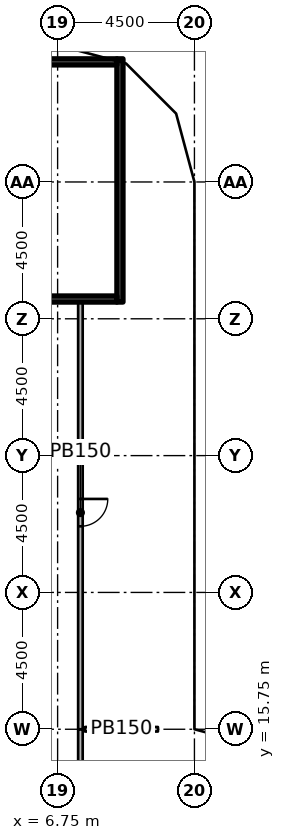
"""IFC4 building model, lengths in metres.
Left out: names, types, materials, properties, quantities, classifications, styles, units other than length and angle.
Written with IfcOpenShell. Run it as: python <this file> out.ifc"""

import sys

from ifc_helpers import new_model, si_unit, direction, frame, frame_2d, origin, origin_2d, place, context, subcontext, project, spatial, rectangle, extrude, element, fill, save


model = new_model("IFC4")
c1 = context("Model", 3, precision=1e-05, world=origin(), true_north=direction((0.0, 1.0)))
c2 = subcontext(c1, "Body", "Model", "MODEL_VIEW")
j1 = project(units=[si_unit("LENGTHUNIT", "METRE"), si_unit("PLANEANGLEUNIT", "RADIAN")], contexts=[c1])
p1 = place(None, origin())
s1 = spatial("IfcSite", under=j1, at=p1, CompositionType="ELEMENT")
p2 = place(p1, origin())
s2 = spatial("IfcBuilding", under=s1, at=p2, CompositionType="ELEMENT")
p3 = place(p2, frame((0.0, 0.0, 22.0)))
s3 = spatial("IfcBuildingStorey", under=s2, at=p3, CompositionType="ELEMENT", Elevation=22.0)
for number, where, z_axis, x_axis in (
    (1, (6.25, 15.75, 0.0), (0.0, 0.0, 1.0), (1.0, 0.0, 0.0)),
    (2, (6.25, 20.25, 0.0), (0.0, 0.0, 1.0), (1.0, 0.0, 0.0)),
    (3, (6.25, 24.65, 0.0), (0.0, 0.0, 1.0), (1.0, 0.0, 0.0)),
    (4, (6.25, 26.7, 0.0), (0.0, 0.0, 1.0), (1.0, 0.0, 0.0)),
):
    element("IfcColumn", number, at=place(p3, frame(where, z_axis=z_axis, x_axis=x_axis)), inside=s3, PredefinedType="COLUMN", context=c2, shape_type="SweptSolid", body=[
        extrude(rectangle(XDim=1.2, YDim=1.2, at=origin_2d()), origin(), (0.0, 0.0, 1.0), 4.85),
    ])
for number, where, z_axis, x_axis in (
    (5, (10.65, 15.15, 0.0), (0.0, 0.0, 1.0), (1.0, 0.0, 0.0)),
    (6, (10.65, 20.25, 0.0), (0.0, 0.0, 1.0), (1.0, 0.0, 0.0)),
    (7, (10.47, 33.75, 0.0), (0.0, 0.0, 1.0), (1.0, 0.0, 0.0)),
):
    element("IfcColumn", number, at=place(p3, frame(where, z_axis=z_axis, x_axis=x_axis)), inside=s3, PredefinedType="COLUMN", context=c2, shape_type="SweptSolid", body=[
        extrude(rectangle(XDim=1.2, YDim=1.2, at=origin_2d()), origin(), (0.0, 0.0, 1.0), 4.55),
    ])
p4 = place(p3, frame((8.8, 29.8, 0.0), z_axis=(0.0, 0.0, 1.0), x_axis=(0.0, 1.0, 0.0)))
e8 = element("IfcWall", 8, at=p4, inside=s3, PredefinedType="SHEAR", context=c2, shape_type="SweptSolid", body=[
    extrude(rectangle(XDim=8.0, YDim=0.2, at=frame_2d((4.0, 0.0))), origin(), (0.0, 0.0, 1.0), 4.55),
])
for number, where, z_axis, x_axis in (
    (9, (4.5, 29.9, 0.0), (0.0, 0.0, 1.0), (1.0, 0.0, 0.0)),
    (10, (4.5, 37.7, 0.0), (0.0, 0.0, 1.0), (1.0, 0.0, 0.0)),
):
    element("IfcWall", number, at=place(p3, frame(where, z_axis=z_axis, x_axis=x_axis)), inside=s3, PredefinedType="SHEAR", context=c2, shape_type="SweptSolid", body=[
        extrude(rectangle(XDim=4.2, YDim=0.2, at=frame_2d((2.1, 0.0))), origin(), (0.0, 0.0, 1.0), 4.55),
    ])
p5 = place(p3, frame((7.5, 15.75, 0.0), z_axis=(0.0, 0.0, 1.0), x_axis=(0.0, -1.0, 0.0)))
e11 = element("IfcWall", 11, at=p5, inside=s3, PredefinedType="PARTITIONING", context=c2, shape_type="SweptSolid", body=[
    extrude(rectangle(XDim=7.5, YDim=0.15, at=frame_2d((3.75, 0.0))), origin(), (0.0, 0.0, 1.0), 3.93),
])
p6 = place(p5, frame((3.25, 0.0, 0.0)))
e12 = element("IfcOpeningElement", 12, at=p6, cuts=e11, PredefinedType="OPENING", context=c2, shape_type="SweptSolid", body=[
    extrude(rectangle(XDim=1.0, YDim=2.1, at=frame_2d((0.5, 1.05))), frame((0.0, 0.085, 0.0), z_axis=(0.0, -1.0, 0.0), x_axis=(1.0, 0.0, 0.0)), (0.0, 0.0, 1.0), 0.17),
])
p7 = place(p3, frame((7.5, 30.0, 0.0), z_axis=(0.0, 0.0, 1.0), x_axis=(0.0, -1.0, 0.0)))
e13 = element("IfcWall", 13, at=p7, inside=s3, PredefinedType="PARTITIONING", context=c2, shape_type="SweptSolid", body=[
    extrude(rectangle(XDim=14.25, YDim=0.15, at=frame_2d((7.125, 0.0))), origin(), (0.0, 0.0, 1.0), 4.55),
])
p8 = place(p7, frame((6.675, 0.0, 0.0)))
e14 = element("IfcOpeningElement", 14, at=p8, cuts=e13, PredefinedType="OPENING", context=c2, shape_type="SweptSolid", body=[
    extrude(rectangle(XDim=0.9, YDim=2.1, at=frame_2d((0.45, 1.05))), frame((0.0, 0.085, 0.0), z_axis=(0.0, -1.0, 0.0), x_axis=(1.0, 0.0, 0.0)), (0.0, 0.0, 1.0), 0.17),
])
p9 = place(p3, frame((7.65, 15.75, 0.0), z_axis=(0.0, 0.0, 1.0), x_axis=(1.0, 0.0, 0.0)))
e15 = element("IfcWall", 15, at=p9, inside=s3, PredefinedType="PARTITIONING", context=c2, shape_type="SweptSolid", body=[
    extrude(rectangle(XDim=2.4, YDim=0.15, at=frame_2d((1.2, 0.0))), origin(), (0.0, 0.0, 1.0), 4.55),
])
p10 = place(p8, origin())
e16 = element("IfcDoor", 16, at=p10, inside=s3, OperationType="SINGLE_SWING_LEFT", PredefinedType="DOOR", context=c2, shape_type="SweptSolid", body=[
    extrude(rectangle(XDim=0.9, YDim=2.1, at=frame_2d((0.45, 1.05))), frame((0.0, 0.025, 0.0), z_axis=(0.0, -1.0, 0.0), x_axis=(1.0, 0.0, 0.0)), (0.0, 0.0, 1.0), 0.05),
])
fill(e14, e16)
save(model, sys.argv[1])
